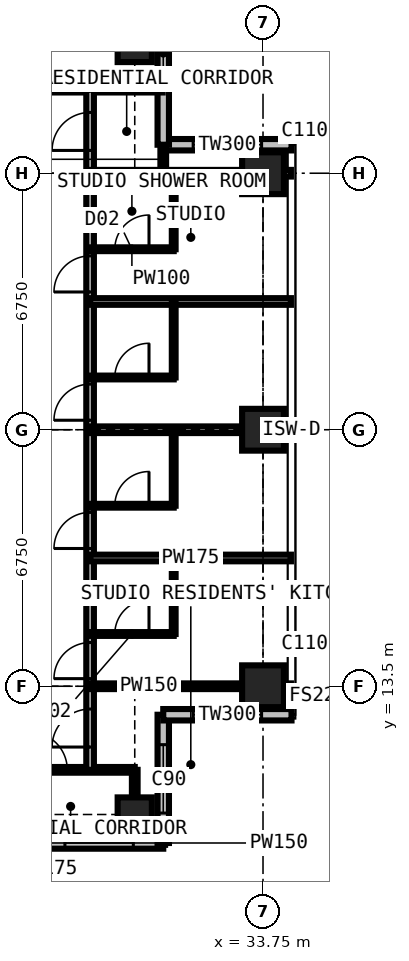
"""IFC4 building model, lengths in metres.
Left out: names, types, materials, properties, quantities, classifications, styles, units other than length and angle.
Written with IfcOpenShell. Run it as: python <this file> out.ifc"""

import sys

from ifc_helpers import new_model, si_unit, direction, frame, frame_2d, origin, origin_2d, place, context, subcontext, project, spatial, rectangle, extrude, element, fill, save


model = new_model("IFC4")
c1 = context("Model", 3, precision=1e-05, world=origin(), true_north=direction((0.0, 1.0)))
c2 = subcontext(c1, "Body", "Model", "MODEL_VIEW")
j1 = project(units=[si_unit("LENGTHUNIT", "METRE"), si_unit("PLANEANGLEUNIT", "RADIAN")], contexts=[c1])
p1 = place(None, origin())
s1 = spatial("IfcSite", under=j1, at=p1, CompositionType="ELEMENT")
p2 = place(p1, origin())
s2 = spatial("IfcBuilding", under=s1, at=p2, CompositionType="ELEMENT")
p3 = place(p2, frame((0.0, 0.0, 225.9)))
s3 = spatial("IfcBuildingStorey", under=s2, at=p3, CompositionType="ELEMENT", Elevation=225.9)
for number, where, z_axis, x_axis in (
    (1, (30.375, 10.125, 0.0), (0.0, 0.0, 1.0), (1.0, 0.0, 0.0)),
    (2, (30.375, 30.375, 0.0), (0.0, 0.0, 1.0), (1.0, 0.0, 0.0)),
):
    element("IfcColumn", number, at=place(p3, frame(where, z_axis=z_axis, x_axis=x_axis)), inside=s3, PredefinedType="COLUMN", context=c2, shape_type="SweptSolid", body=[
        extrude(rectangle(XDim=0.9, YDim=0.9, at=origin_2d()), origin(), (0.0, 0.0, 1.0), 3.6),
    ])
for number, where, z_axis, x_axis in (
    (3, (33.75, 13.5, 0.0), (0.0, 0.0, 1.0), (1.0, 0.0, 0.0)),
    (4, (33.75, 20.25, 0.0), (0.0, 0.0, 1.0), (1.0, 0.0, 0.0)),
    (5, (33.75, 27.0, 0.0), (0.0, 0.0, 1.0), (1.0, 0.0, 0.0)),
):
    element("IfcColumn", number, at=place(p3, frame(where, z_axis=z_axis, x_axis=x_axis)), inside=s3, PredefinedType="COLUMN", context=c2, shape_type="SweptSolid", body=[
        extrude(rectangle(XDim=1.1, YDim=1.1, at=origin_2d()), origin(), (0.0, 0.0, 1.0), 3.6),
    ])
p4 = place(p3, frame((34.5, 27.75, 0.0), z_axis=(0.0, 0.0, 1.0), x_axis=(-1.0, 0.0, 0.0)))
e6 = element("IfcWall", 6, at=p4, inside=s3, PredefinedType="SOLIDWALL", context=c2, shape_type="SweptSolid", body=[
    extrude(rectangle(XDim=3.375, YDim=0.3, at=frame_2d((1.688, 0.0))), origin(), (0.0, 0.0, 1.0), 3.375),
])
p5 = place(p4, frame((0.788, 0.0, 0.6)))
e7 = element("IfcOpeningElement", 7, at=p5, cuts=e6, PredefinedType="OPENING", context=c2, shape_type="SweptSolid", body=[
    extrude(rectangle(XDim=1.8, YDim=2.1, at=frame_2d((0.9, 1.05))), frame((0.0, 0.16, 0.0), z_axis=(0.0, -1.0, 0.0), x_axis=(1.0, 0.0, 0.0)), (0.0, 0.0, 1.0), 0.32),
])
p6 = place(p3, frame((31.125, 27.75, 0.0), z_axis=(0.0, 0.0, 1.0), x_axis=(0.0, 1.0, 0.0)))
e8 = element("IfcWall", 8, at=p6, inside=s3, PredefinedType="SOLIDWALL", context=c2, shape_type="SweptSolid", body=[
    extrude(rectangle(XDim=3.375, YDim=0.3, at=frame_2d((1.688, 0.0))), origin(), (0.0, 0.0, 1.0), 3.375),
])
p7 = place(p6, frame((1.663, 0.0, 0.9)))
e9 = element("IfcOpeningElement", 9, at=p7, cuts=e8, PredefinedType="OPENING", context=c2, shape_type="SweptSolid", body=[
    extrude(rectangle(XDim=1.5, YDim=1.8, at=frame_2d((0.75, 0.9))), frame((0.0, 0.16, 0.0), z_axis=(0.0, -1.0, 0.0), x_axis=(1.0, 0.0, 0.0)), (0.0, 0.0, 1.0), 0.32),
])
p8 = place(p3, frame((27.75, 9.375, 0.0), z_axis=(0.0, 0.0, 1.0), x_axis=(1.0, 0.0, 0.0)))
e10 = element("IfcWall", 10, at=p8, inside=s3, PredefinedType="SOLIDWALL", context=c2, shape_type="SweptSolid", body=[
    extrude(rectangle(XDim=3.375, YDim=0.3, at=frame_2d((1.688, 0.0))), origin(), (0.0, 0.0, 1.0), 3.375),
])
p9 = place(p8, frame((0.788, 0.0, 0.6)))
e11 = element("IfcOpeningElement", 11, at=p9, cuts=e10, PredefinedType="OPENING", context=c2, shape_type="SweptSolid", body=[
    extrude(rectangle(XDim=1.8, YDim=2.1, at=frame_2d((0.9, 1.05))), frame((0.0, 0.16, 0.0), z_axis=(0.0, -1.0, 0.0), x_axis=(1.0, 0.0, 0.0)), (0.0, 0.0, 1.0), 0.32),
])
p10 = place(p3, frame((31.125, 9.375, 0.0), z_axis=(0.0, 0.0, 1.0), x_axis=(0.0, 1.0, 0.0)))
e12 = element("IfcWall", 12, at=p10, inside=s3, PredefinedType="SOLIDWALL", context=c2, shape_type="SweptSolid", body=[
    extrude(rectangle(XDim=3.375, YDim=0.3, at=frame_2d((1.688, 0.0))), origin(), (0.0, 0.0, 1.0), 3.375),
])
p11 = place(p10, frame((0.788, 0.0, 0.6)))
e13 = element("IfcOpeningElement", 13, at=p11, cuts=e12, PredefinedType="OPENING", context=c2, shape_type="SweptSolid", body=[
    extrude(rectangle(XDim=1.8, YDim=2.1, at=frame_2d((0.9, 1.05))), frame((0.0, 0.16, 0.0), z_axis=(0.0, -1.0, 0.0), x_axis=(1.0, 0.0, 0.0)), (0.0, 0.0, 1.0), 0.32),
])
p12 = place(p3, frame((31.125, 12.75, 0.0), z_axis=(0.0, 0.0, 1.0), x_axis=(1.0, 0.0, 0.0)))
e14 = element("IfcWall", 14, at=p12, inside=s3, PredefinedType="SOLIDWALL", context=c2, shape_type="SweptSolid", body=[
    extrude(rectangle(XDim=3.375, YDim=0.3, at=frame_2d((1.688, 0.0))), origin(), (0.0, 0.0, 1.0), 3.375),
])
p13 = place(p12, frame((0.788, 0.0, 0.6)))
e15 = element("IfcOpeningElement", 15, at=p13, cuts=e14, PredefinedType="OPENING", context=c2, shape_type="SweptSolid", body=[
    extrude(rectangle(XDim=1.8, YDim=2.1, at=frame_2d((0.9, 1.05))), frame((0.0, 0.16, 0.0), z_axis=(0.0, -1.0, 0.0), x_axis=(1.0, 0.0, 0.0)), (0.0, 0.0, 1.0), 0.32),
])
p14 = place(p3, frame((11.3, 29.2, 0.0), z_axis=(0.0, 0.0, 1.0), x_axis=(1.0, 0.0, 0.0)))
e16 = element("IfcWall", 16, at=p14, inside=s3, PredefinedType="PARTITIONING", context=c2, shape_type="SweptSolid", body=[
    extrude(rectangle(XDim=19.809, YDim=0.15, at=frame_2d((9.904, 0.0))), origin(), (0.0, 0.0, 1.0), 3.375),
])
p15 = place(p14, frame((14.625, 0.0, 0.0)))
e17 = element("IfcOpeningElement", 17, at=p15, cuts=e16, PredefinedType="OPENING", context=c2, shape_type="SweptSolid", body=[
    extrude(rectangle(XDim=1.0, YDim=2.2, at=frame_2d((0.5, 1.1))), frame((0.0, 0.085, 0.0), z_axis=(0.0, -1.0, 0.0), x_axis=(1.0, 0.0, 0.0)), (0.0, 0.0, 1.0), 0.17),
])
p16 = place(p14, frame((6.4, 0.0, 0.0)))
e18 = element("IfcOpeningElement", 18, at=p16, cuts=e16, PredefinedType="OPENING", context=c2, shape_type="SweptSolid", body=[
    extrude(rectangle(XDim=0.95, YDim=2.2, at=frame_2d((0.475, 1.1))), frame((0.0, 0.085, 0.0), z_axis=(0.0, -1.0, 0.0), x_axis=(1.0, 0.0, 0.0)), (0.0, 0.0, 1.0), 0.17),
])
p17 = place(p14, frame((9.2, 0.0, 0.0)))
e19 = element("IfcOpeningElement", 19, at=p17, cuts=e16, PredefinedType="OPENING", context=c2, shape_type="SweptSolid", body=[
    extrude(rectangle(XDim=0.95, YDim=2.2, at=frame_2d((0.475, 1.1))), frame((0.0, 0.085, 0.0), z_axis=(0.0, -1.0, 0.0), x_axis=(1.0, 0.0, 0.0)), (0.0, 0.0, 1.0), 0.17),
])
p18 = place(p14, frame((0.6, 0.0, 0.0)))
e20 = element("IfcOpeningElement", 20, at=p18, cuts=e16, PredefinedType="OPENING", context=c2, shape_type="SweptSolid", body=[
    extrude(rectangle(XDim=1.0, YDim=2.2, at=frame_2d((0.5, 1.1))), frame((0.0, 0.085, 0.0), z_axis=(0.0, -1.0, 0.0), x_axis=(1.0, 0.0, 0.0)), (0.0, 0.0, 1.0), 0.17),
])
p19 = place(p3, frame((27.0, 11.3, 0.0), z_axis=(0.0, 0.0, 1.0), x_axis=(1.0, 0.0, 0.0)))
e21 = element("IfcWall", 21, at=p19, inside=s3, PredefinedType="PARTITIONING", context=c2, shape_type="SweptSolid", body=[
    extrude(rectangle(XDim=3.375, YDim=0.15, at=frame_2d((1.688, 0.0))), origin(), (0.0, 0.0, 1.0), 3.375),
])
p20 = place(p19, frame((0.6, 0.0, 0.0)))
e22 = element("IfcOpeningElement", 22, at=p20, cuts=e21, PredefinedType="OPENING", context=c2, shape_type="SweptSolid", body=[
    extrude(rectangle(XDim=1.0, YDim=2.2, at=frame_2d((0.5, 1.1))), frame((0.0, 0.085, 0.0), z_axis=(0.0, -1.0, 0.0), x_axis=(1.0, 0.0, 0.0)), (0.0, 0.0, 1.0), 0.17),
])
p21 = place(p3, frame((29.2, 11.3, 0.0), z_axis=(0.0, 0.0, 1.0), x_axis=(0.0, 1.0, 0.0)))
e23 = element("IfcWall", 23, at=p21, inside=s3, PredefinedType="PARTITIONING", context=c2, shape_type="SweptSolid", body=[
    extrude(rectangle(XDim=17.9, YDim=0.2, at=frame_2d((8.95, 0.0))), origin(), (0.0, 0.0, 1.0), 3.375),
])
p22 = place(p21, frame((0.6, 0.0, 0.0)))
e24 = element("IfcOpeningElement", 24, at=p22, cuts=e23, PredefinedType="OPENING", context=c2, shape_type="SweptSolid", body=[
    extrude(rectangle(XDim=1.0, YDim=2.2, at=frame_2d((0.5, 1.1))), frame((0.0, 0.11, 0.0), z_axis=(0.0, -1.0, 0.0), x_axis=(1.0, 0.0, 0.0)), (0.0, 0.0, 1.0), 0.22),
])
p23 = place(p21, frame((2.4, 0.0, 0.0)))
e25 = element("IfcOpeningElement", 25, at=p23, cuts=e23, PredefinedType="OPENING", context=c2, shape_type="SweptSolid", body=[
    extrude(rectangle(XDim=0.95, YDim=2.2, at=frame_2d((0.475, 1.1))), frame((0.0, 0.11, 0.0), z_axis=(0.0, -1.0, 0.0), x_axis=(1.0, 0.0, 0.0)), (0.0, 0.0, 1.0), 0.22),
])
p24 = place(p21, frame((5.825, 0.0, 0.0)))
e26 = element("IfcOpeningElement", 26, at=p24, cuts=e23, PredefinedType="OPENING", context=c2, shape_type="SweptSolid", body=[
    extrude(rectangle(XDim=0.95, YDim=2.2, at=frame_2d((0.475, 1.1))), frame((0.0, 0.11, 0.0), z_axis=(0.0, -1.0, 0.0), x_axis=(1.0, 0.0, 0.0)), (0.0, 0.0, 1.0), 0.22),
])
p25 = place(p21, frame((9.2, 0.0, 0.0)))
e27 = element("IfcOpeningElement", 27, at=p25, cuts=e23, PredefinedType="OPENING", context=c2, shape_type="SweptSolid", body=[
    extrude(rectangle(XDim=0.95, YDim=2.2, at=frame_2d((0.475, 1.1))), frame((0.0, 0.11, 0.0), z_axis=(0.0, -1.0, 0.0), x_axis=(1.0, 0.0, 0.0)), (0.0, 0.0, 1.0), 0.22),
])
p26 = place(p21, frame((12.575, 0.0, 0.0)))
e28 = element("IfcOpeningElement", 28, at=p26, cuts=e23, PredefinedType="OPENING", context=c2, shape_type="SweptSolid", body=[
    extrude(rectangle(XDim=0.95, YDim=2.2, at=frame_2d((0.475, 1.1))), frame((0.0, 0.11, 0.0), z_axis=(0.0, -1.0, 0.0), x_axis=(1.0, 0.0, 0.0)), (0.0, 0.0, 1.0), 0.22),
])
p27 = place(p21, frame((16.3, 0.0, 0.0)))
e29 = element("IfcOpeningElement", 29, at=p27, cuts=e23, PredefinedType="OPENING", context=c2, shape_type="SweptSolid", body=[
    extrude(rectangle(XDim=1.0, YDim=2.2, at=frame_2d((0.5, 1.1))), frame((0.0, 0.11, 0.0), z_axis=(0.0, -1.0, 0.0), x_axis=(1.0, 0.0, 0.0)), (0.0, 0.0, 1.0), 0.22),
])
p28 = place(p3, frame((29.2, 13.5, 0.0), z_axis=(0.0, 0.0, 1.0), x_axis=(1.0, 0.0, 0.0)))
e30 = element("IfcWall", 30, at=p28, inside=s3, PredefinedType="PARTITIONING", context=c2, shape_type="SweptSolid", body=[
    extrude(rectangle(XDim=5.284, YDim=0.15, at=frame_2d((2.642, 0.0))), origin(), (0.0, 0.0, 1.0), 2.877),
])
p29 = place(p3, frame((29.2, 14.875, 0.0), z_axis=(0.0, 0.0, 1.0), x_axis=(1.0, 0.0, 0.0)))
e31 = element("IfcWall", 31, at=p29, inside=s3, PredefinedType="PARTITIONING", context=c2, shape_type="SweptSolid", body=[
    extrude(rectangle(XDim=2.2, YDim=0.1, at=frame_2d((1.1, 0.0))), origin(), (0.0, 0.0, 1.0), 3.375),
])
p30 = place(p29, frame((0.65, 0.0, 0.0)))
e32 = element("IfcOpeningElement", 32, at=p30, cuts=e31, PredefinedType="OPENING", context=c2, shape_type="SweptSolid", body=[
    extrude(rectangle(XDim=0.9, YDim=2.2, at=frame_2d((0.45, 1.1))), frame((0.0, 0.06, 0.0), z_axis=(0.0, -1.0, 0.0), x_axis=(1.0, 0.0, 0.0)), (0.0, 0.0, 1.0), 0.12),
])
p31 = place(p3, frame((29.2, 16.875, 0.0), z_axis=(0.0, 0.0, 1.0), x_axis=(1.0, 0.0, 0.0)))
e33 = element("IfcWall", 33, at=p31, inside=s3, PredefinedType="PARTITIONING", context=c2, shape_type="SweptSolid", body=[
    extrude(rectangle(XDim=5.284, YDim=0.175, at=frame_2d((2.642, 0.0))), origin(), (0.0, 0.0, 1.0), 3.375),
])
p32 = place(p3, frame((29.2, 18.25, 0.0), z_axis=(0.0, 0.0, 1.0), x_axis=(1.0, 0.0, 0.0)))
e34 = element("IfcWall", 34, at=p32, inside=s3, PredefinedType="PARTITIONING", context=c2, shape_type="SweptSolid", body=[
    extrude(rectangle(XDim=2.2, YDim=0.1, at=frame_2d((1.1, 0.0))), origin(), (0.0, 0.0, 1.0), 3.375),
])
p33 = place(p32, frame((0.65, 0.0, 0.0)))
e35 = element("IfcOpeningElement", 35, at=p33, cuts=e34, PredefinedType="OPENING", context=c2, shape_type="SweptSolid", body=[
    extrude(rectangle(XDim=0.9, YDim=2.2, at=frame_2d((0.45, 1.1))), frame((0.0, 0.06, 0.0), z_axis=(0.0, -1.0, 0.0), x_axis=(1.0, 0.0, 0.0)), (0.0, 0.0, 1.0), 0.12),
])
p34 = place(p3, frame((29.2, 20.25, 0.0), z_axis=(0.0, 0.0, 1.0), x_axis=(1.0, 0.0, 0.0)))
e36 = element("IfcWall", 36, at=p34, inside=s3, PredefinedType="PARTITIONING", context=c2, shape_type="SweptSolid", body=[
    extrude(rectangle(XDim=5.284, YDim=0.175, at=frame_2d((2.642, 0.0))), origin(), (0.0, 0.0, 1.0), 2.877),
])
p35 = place(p3, frame((29.2, 21.625, 0.0), z_axis=(0.0, 0.0, 1.0), x_axis=(1.0, 0.0, 0.0)))
e37 = element("IfcWall", 37, at=p35, inside=s3, PredefinedType="PARTITIONING", context=c2, shape_type="SweptSolid", body=[
    extrude(rectangle(XDim=2.2, YDim=0.1, at=frame_2d((1.1, 0.0))), origin(), (0.0, 0.0, 1.0), 3.375),
])
p36 = place(p35, frame((0.65, 0.0, 0.0)))
e38 = element("IfcOpeningElement", 38, at=p36, cuts=e37, PredefinedType="OPENING", context=c2, shape_type="SweptSolid", body=[
    extrude(rectangle(XDim=0.9, YDim=2.2, at=frame_2d((0.45, 1.1))), frame((0.0, 0.06, 0.0), z_axis=(0.0, -1.0, 0.0), x_axis=(1.0, 0.0, 0.0)), (0.0, 0.0, 1.0), 0.12),
])
p37 = place(p3, frame((29.2, 23.625, 0.0), z_axis=(0.0, 0.0, 1.0), x_axis=(1.0, 0.0, 0.0)))
e39 = element("IfcWall", 39, at=p37, inside=s3, PredefinedType="PARTITIONING", context=c2, shape_type="SweptSolid", body=[
    extrude(rectangle(XDim=5.284, YDim=0.175, at=frame_2d((2.642, 0.0))), origin(), (0.0, 0.0, 1.0), 3.375),
])
p38 = place(p3, frame((29.2, 25.0, 0.0), z_axis=(0.0, 0.0, 1.0), x_axis=(1.0, 0.0, 0.0)))
e40 = element("IfcWall", 40, at=p38, inside=s3, PredefinedType="PARTITIONING", context=c2, shape_type="SweptSolid", body=[
    extrude(rectangle(XDim=2.2, YDim=0.1, at=frame_2d((1.1, 0.0))), origin(), (0.0, 0.0, 1.0), 3.375),
])
p39 = place(p38, frame((0.65, 0.0, 0.0)))
e41 = element("IfcOpeningElement", 41, at=p39, cuts=e40, PredefinedType="OPENING", context=c2, shape_type="SweptSolid", body=[
    extrude(rectangle(XDim=0.9, YDim=2.2, at=frame_2d((0.45, 1.1))), frame((0.0, 0.06, 0.0), z_axis=(0.0, -1.0, 0.0), x_axis=(1.0, 0.0, 0.0)), (0.0, 0.0, 1.0), 0.12),
])
p40 = place(p3, frame((29.2, 27.0, 0.0), z_axis=(0.0, 0.0, 1.0), x_axis=(1.0, 0.0, 0.0)))
e42 = element("IfcWall", 42, at=p40, inside=s3, PredefinedType="PARTITIONING", context=c2, shape_type="SweptSolid", body=[
    extrude(rectangle(XDim=5.284, YDim=0.175, at=frame_2d((2.642, 0.0))), origin(), (0.0, 0.0, 1.0), 2.877),
])
p41 = place(p3, frame((30.375, 9.525, 0.0), z_axis=(0.0, 0.0, 1.0), x_axis=(0.0, 1.0, 0.0)))
e43 = element("IfcWall", 43, at=p41, inside=s3, PredefinedType="PARTITIONING", context=c2, shape_type="SweptSolid", body=[
    extrude(rectangle(XDim=1.775, YDim=0.15, at=frame_2d((0.888, 0.0))), origin(), (0.0, 0.0, 1.0), 2.877),
])
p42 = place(p3, frame((31.125, 27.0, 0.0), z_axis=(0.0, 0.0, 1.0), x_axis=(0.0, 1.0, 0.0)))
e44 = element("IfcWall", 44, at=p42, inside=s3, PredefinedType="PARTITIONING", context=c2, shape_type="SweptSolid", body=[
    extrude(rectangle(XDim=0.734, YDim=0.15, at=frame_2d((0.367, 0.0))), origin(), (0.0, 0.0, 1.0), 3.375),
])
for number, where, z_axis, x_axis in (
    (45, (31.4, 14.875, 0.0), (0.0, 0.0, 1.0), (0.0, 1.0, 0.0)),
    (46, (31.4, 18.25, 0.0), (0.0, 0.0, 1.0), (0.0, 1.0, 0.0)),
    (47, (31.4, 21.625, 0.0), (0.0, 0.0, 1.0), (0.0, 1.0, 0.0)),
    (48, (31.4, 25.0, 0.0), (0.0, 0.0, 1.0), (0.0, 1.0, 0.0)),
):
    element("IfcWall", number, at=place(p3, frame(where, z_axis=z_axis, x_axis=x_axis)), inside=s3, PredefinedType="PARTITIONING", context=c2, shape_type="SweptSolid", body=[
        extrude(rectangle(XDim=2.0, YDim=0.1, at=frame_2d((1.0, 0.0))), origin(), (0.0, 0.0, 1.0), 3.375),
    ])
p43 = place(p5, origin())
e49 = element("IfcWindow", 49, at=p43, inside=s3, PartitioningType="SINGLE_PANEL", PredefinedType="WINDOW", context=c2, shape_type="SweptSolid", body=[
    extrude(rectangle(XDim=1.8, YDim=2.1, at=frame_2d((0.9, 1.05))), frame((0.0, 0.03, 0.0), z_axis=(0.0, -1.0, 0.0), x_axis=(1.0, 0.0, 0.0)), (0.0, 0.0, 1.0), 0.06),
])
fill(e7, e49)
p44 = place(p7, origin())
e50 = element("IfcWindow", 50, at=p44, inside=s3, PartitioningType="SINGLE_PANEL", PredefinedType="WINDOW", context=c2, shape_type="SweptSolid", body=[
    extrude(rectangle(XDim=1.5, YDim=1.8, at=frame_2d((0.75, 0.9))), frame((0.0, 0.03, 0.0), z_axis=(0.0, -1.0, 0.0), x_axis=(1.0, 0.0, 0.0)), (0.0, 0.0, 1.0), 0.06),
])
fill(e9, e50)
p45 = place(p9, origin())
e51 = element("IfcWindow", 51, at=p45, inside=s3, PartitioningType="SINGLE_PANEL", PredefinedType="WINDOW", context=c2, shape_type="SweptSolid", body=[
    extrude(rectangle(XDim=1.8, YDim=2.1, at=frame_2d((0.9, 1.05))), frame((0.0, 0.03, 0.0), z_axis=(0.0, -1.0, 0.0), x_axis=(1.0, 0.0, 0.0)), (0.0, 0.0, 1.0), 0.06),
])
fill(e11, e51)
p46 = place(p11, origin())
e52 = element("IfcWindow", 52, at=p46, inside=s3, PartitioningType="SINGLE_PANEL", PredefinedType="WINDOW", context=c2, shape_type="SweptSolid", body=[
    extrude(rectangle(XDim=1.8, YDim=2.1, at=frame_2d((0.9, 1.05))), frame((0.0, 0.03, 0.0), z_axis=(0.0, -1.0, 0.0), x_axis=(1.0, 0.0, 0.0)), (0.0, 0.0, 1.0), 0.06),
])
fill(e13, e52)
p47 = place(p13, origin())
e53 = element("IfcWindow", 53, at=p47, inside=s3, PartitioningType="SINGLE_PANEL", PredefinedType="WINDOW", context=c2, shape_type="SweptSolid", body=[
    extrude(rectangle(XDim=1.8, YDim=2.1, at=frame_2d((0.9, 1.05))), frame((0.0, 0.03, 0.0), z_axis=(0.0, -1.0, 0.0), x_axis=(1.0, 0.0, 0.0)), (0.0, 0.0, 1.0), 0.06),
])
fill(e15, e53)
p48 = place(p20, origin())
e54 = element("IfcDoor", 54, at=p48, inside=s3, OperationType="SINGLE_SWING_LEFT", PredefinedType="DOOR", context=c2, shape_type="SweptSolid", body=[
    extrude(rectangle(XDim=1.0, YDim=2.2, at=frame_2d((0.5, 1.1))), frame((0.0, 0.025, 0.0), z_axis=(0.0, -1.0, 0.0), x_axis=(1.0, 0.0, 0.0)), (0.0, 0.0, 1.0), 0.05),
])
fill(e22, e54)
p49 = place(p22, origin())
e55 = element("IfcDoor", 55, at=p49, inside=s3, OperationType="SINGLE_SWING_LEFT", PredefinedType="DOOR", context=c2, shape_type="SweptSolid", body=[
    extrude(rectangle(XDim=1.0, YDim=2.2, at=frame_2d((0.5, 1.1))), frame((0.0, 0.025, 0.0), z_axis=(0.0, -1.0, 0.0), x_axis=(1.0, 0.0, 0.0)), (0.0, 0.0, 1.0), 0.05),
])
fill(e24, e55)
p50 = place(p23, origin())
e56 = element("IfcDoor", 56, at=p50, inside=s3, OperationType="SINGLE_SWING_LEFT", PredefinedType="DOOR", context=c2, shape_type="SweptSolid", body=[
    extrude(rectangle(XDim=0.95, YDim=2.2, at=frame_2d((0.475, 1.1))), frame((0.0, 0.025, 0.0), z_axis=(0.0, -1.0, 0.0), x_axis=(1.0, 0.0, 0.0)), (0.0, 0.0, 1.0), 0.05),
])
fill(e25, e56)
p51 = place(p30, origin())
e57 = element("IfcDoor", 57, at=p51, inside=s3, OperationType="SINGLE_SWING_RIGHT", PredefinedType="DOOR", context=c2, shape_type="SweptSolid", body=[
    extrude(rectangle(XDim=0.9, YDim=2.2, at=frame_2d((0.45, 1.1))), frame((0.0, 0.025, 0.0), z_axis=(0.0, -1.0, 0.0), x_axis=(1.0, 0.0, 0.0)), (0.0, 0.0, 1.0), 0.05),
])
fill(e32, e57)
p52 = place(p24, origin())
e58 = element("IfcDoor", 58, at=p52, inside=s3, OperationType="SINGLE_SWING_LEFT", PredefinedType="DOOR", context=c2, shape_type="SweptSolid", body=[
    extrude(rectangle(XDim=0.95, YDim=2.2, at=frame_2d((0.475, 1.1))), frame((0.0, 0.025, 0.0), z_axis=(0.0, -1.0, 0.0), x_axis=(1.0, 0.0, 0.0)), (0.0, 0.0, 1.0), 0.05),
])
fill(e26, e58)
p53 = place(p33, origin())
e59 = element("IfcDoor", 59, at=p53, inside=s3, OperationType="SINGLE_SWING_RIGHT", PredefinedType="DOOR", context=c2, shape_type="SweptSolid", body=[
    extrude(rectangle(XDim=0.9, YDim=2.2, at=frame_2d((0.45, 1.1))), frame((0.0, 0.025, 0.0), z_axis=(0.0, -1.0, 0.0), x_axis=(1.0, 0.0, 0.0)), (0.0, 0.0, 1.0), 0.05),
])
fill(e35, e59)
p54 = place(p25, origin())
e60 = element("IfcDoor", 60, at=p54, inside=s3, OperationType="SINGLE_SWING_LEFT", PredefinedType="DOOR", context=c2, shape_type="SweptSolid", body=[
    extrude(rectangle(XDim=0.95, YDim=2.2, at=frame_2d((0.475, 1.1))), frame((0.0, 0.025, 0.0), z_axis=(0.0, -1.0, 0.0), x_axis=(1.0, 0.0, 0.0)), (0.0, 0.0, 1.0), 0.05),
])
fill(e27, e60)
p55 = place(p36, origin())
e61 = element("IfcDoor", 61, at=p55, inside=s3, OperationType="SINGLE_SWING_RIGHT", PredefinedType="DOOR", context=c2, shape_type="SweptSolid", body=[
    extrude(rectangle(XDim=0.9, YDim=2.2, at=frame_2d((0.45, 1.1))), frame((0.0, 0.025, 0.0), z_axis=(0.0, -1.0, 0.0), x_axis=(1.0, 0.0, 0.0)), (0.0, 0.0, 1.0), 0.05),
])
fill(e38, e61)
p56 = place(p26, origin())
e62 = element("IfcDoor", 62, at=p56, inside=s3, OperationType="SINGLE_SWING_LEFT", PredefinedType="DOOR", context=c2, shape_type="SweptSolid", body=[
    extrude(rectangle(XDim=0.95, YDim=2.2, at=frame_2d((0.475, 1.1))), frame((0.0, 0.025, 0.0), z_axis=(0.0, -1.0, 0.0), x_axis=(1.0, 0.0, 0.0)), (0.0, 0.0, 1.0), 0.05),
])
fill(e28, e62)
p57 = place(p39, origin())
e63 = element("IfcDoor", 63, at=p57, inside=s3, OperationType="SINGLE_SWING_RIGHT", PredefinedType="DOOR", context=c2, shape_type="SweptSolid", body=[
    extrude(rectangle(XDim=0.9, YDim=2.2, at=frame_2d((0.45, 1.1))), frame((0.0, 0.025, 0.0), z_axis=(0.0, -1.0, 0.0), x_axis=(1.0, 0.0, 0.0)), (0.0, 0.0, 1.0), 0.05),
])
fill(e41, e63)
p58 = place(p27, origin())
e64 = element("IfcDoor", 64, at=p58, inside=s3, OperationType="SINGLE_SWING_LEFT", PredefinedType="DOOR", context=c2, shape_type="SweptSolid", body=[
    extrude(rectangle(XDim=1.0, YDim=2.2, at=frame_2d((0.5, 1.1))), frame((0.0, 0.025, 0.0), z_axis=(0.0, -1.0, 0.0), x_axis=(1.0, 0.0, 0.0)), (0.0, 0.0, 1.0), 0.05),
])
fill(e29, e64)
save(model, sys.argv[1])
